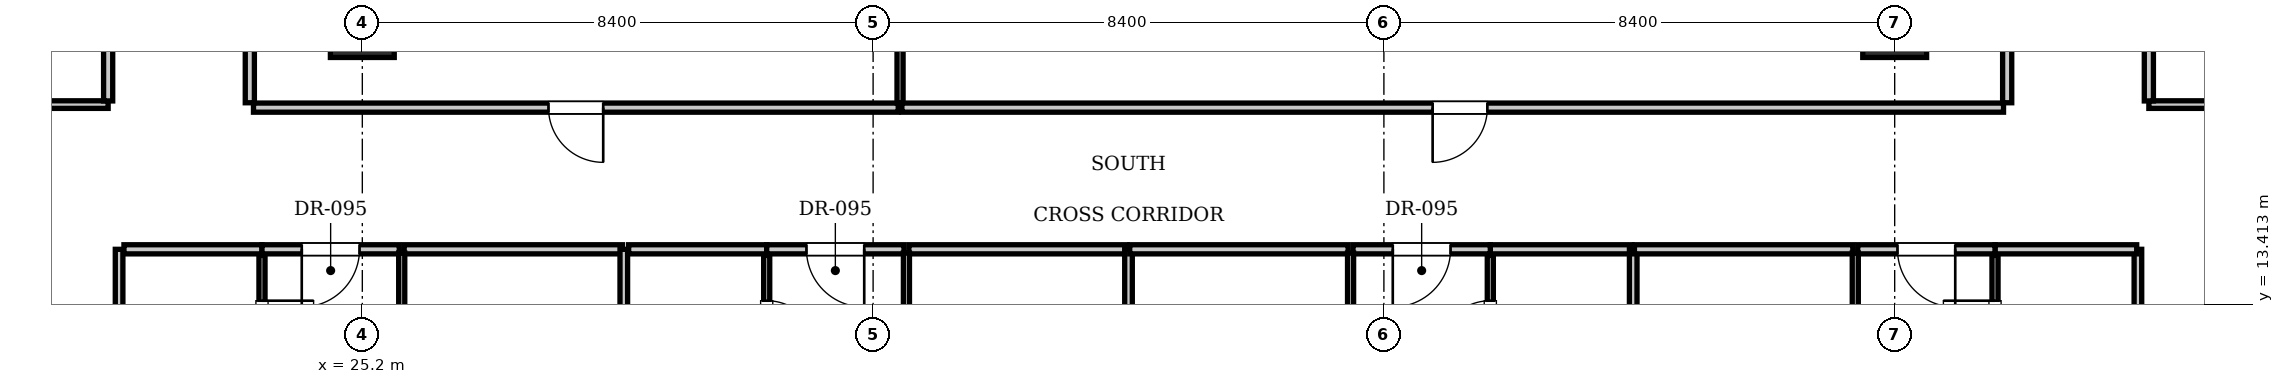
"""IFC4 building model, lengths in metres.
Left out: names, types, materials, properties, quantities, classifications, styles, units other than length and angle.
Written with IfcOpenShell. Run it as: python <this file> out.ifc"""

import sys

from ifc_helpers import new_model, si_unit, direction, frame, frame_2d, origin, origin_2d, place, context, subcontext, project, spatial, rectangle, extrude, element, fill, save


model = new_model("IFC4")
c1 = context("Model", 3, precision=1e-05, world=origin(), true_north=direction((0.0, 1.0)))
c2 = subcontext(c1, "Body", "Model", "MODEL_VIEW")
j1 = project(units=[si_unit("LENGTHUNIT", "METRE"), si_unit("PLANEANGLEUNIT", "RADIAN")], contexts=[c1])
p1 = place(None, origin())
s1 = spatial("IfcSite", under=j1, at=p1, CompositionType="ELEMENT")
p2 = place(p1, origin())
s2 = spatial("IfcBuilding", under=s1, at=p2, CompositionType="ELEMENT")
p3 = place(p2, frame((0.0, 0.0, 50.05)))
s3 = spatial("IfcBuildingStorey", under=s2, at=p3, CompositionType="ELEMENT", Elevation=50.05)
for number, where, z_axis, x_axis in (
    (1, (25.2, 18.0, 0.0), (0.0, 0.0, 1.0), (1.0, 0.0, 0.0)),
    (2, (50.4, 18.0, 0.0), (0.0, 0.0, 1.0), (1.0, 0.0, 0.0)),
):
    element("IfcColumn", number, at=place(p3, frame(where, z_axis=z_axis, x_axis=x_axis)), inside=s3, PredefinedType="COLUMN", context=c2, shape_type="SweptSolid", body=[
        extrude(rectangle(XDim=1.05, YDim=1.05, at=origin_2d()), origin(), (0.0, 0.0, 1.0), 3.85),
    ])
for number, where, z_axis, x_axis in (
    (3, (23.35, 16.73, 0.0), (0.0, 0.0, 1.0), (0.0, 1.0, 0.0)),
    (4, (52.25, 16.73, 0.0), (0.0, 0.0, 1.0), (0.0, 1.0, 0.0)),
):
    element("IfcWall", number, at=place(p3, frame(where, z_axis=z_axis, x_axis=x_axis)), inside=s3, PredefinedType="PARTITIONING", context=c2, shape_type="SweptSolid", body=[
        extrude(rectangle(XDim=7.53, YDim=0.15, at=frame_2d((3.765, 0.0))), origin(), (0.0, 0.0, 1.0), 3.61),
    ])
p4 = place(p3, frame((23.41, 16.65, 0.0), z_axis=(0.0, 0.0, 1.0), x_axis=(1.0, 0.0, 0.0)))
e5 = element("IfcWall", 5, at=p4, inside=s3, PredefinedType="PARTITIONING", context=c2, shape_type="SweptSolid", body=[
    extrude(rectangle(XDim=10.603, YDim=0.15, at=frame_2d((5.302, 0.0))), origin(), (0.0, 0.0, 1.0), 3.61),
])
p5 = place(p4, frame((4.852, 0.0, 0.0)))
e6 = element("IfcOpeningElement", 6, at=p5, cuts=e5, PredefinedType="OPENING", context=c2, shape_type="SweptSolid", body=[
    extrude(rectangle(XDim=0.9, YDim=2.1, at=frame_2d((0.45, 1.05))), frame((0.0, 0.085, 0.0), z_axis=(0.0, -1.0, 0.0), x_axis=(1.0, 0.0, 0.0)), (0.0, 0.0, 1.0), 0.17),
])
p6 = place(p3, frame((34.043, 16.73, 0.0), z_axis=(0.0, 0.0, 1.0), x_axis=(0.0, 1.0, 0.0)))
e7 = element("IfcWall", 7, at=p6, inside=s3, PredefinedType="PARTITIONING", context=c2, shape_type="SweptSolid", body=[
    extrude(rectangle(XDim=7.53, YDim=0.1, at=frame_2d((3.765, 0.0))), origin(), (0.0, 0.0, 1.0), 3.61),
])
p7 = place(p3, frame((34.073, 16.65, 0.0), z_axis=(0.0, 0.0, 1.0), x_axis=(1.0, 0.0, 0.0)))
e8 = element("IfcWall", 8, at=p7, inside=s3, PredefinedType="PARTITIONING", context=c2, shape_type="SweptSolid", body=[
    extrude(rectangle(XDim=18.117, YDim=0.15, at=frame_2d((9.059, 0.0))), origin(), (0.0, 0.0, 1.0), 3.61),
])
p8 = place(p7, frame((8.729, 0.0, 0.0)))
e9 = element("IfcOpeningElement", 9, at=p8, cuts=e8, PredefinedType="OPENING", context=c2, shape_type="SweptSolid", body=[
    extrude(rectangle(XDim=0.9, YDim=2.1, at=frame_2d((0.45, 1.05))), frame((0.0, 0.085, 0.0), z_axis=(0.0, -1.0, 0.0), x_axis=(1.0, 0.0, 0.0)), (0.0, 0.0, 1.0), 0.17),
])
for number, where, z_axis, x_axis in (
    (10, (21.2, 0.1, 0.0), (0.0, 0.0, 1.0), (0.0, 1.0, 0.0)),
    (11, (54.4, 0.1, 0.0), (0.0, 0.0, 1.0), (0.0, 1.0, 0.0)),
):
    element("IfcWall", number, at=place(p3, frame(where, z_axis=z_axis, x_axis=x_axis)), inside=s3, PredefinedType="PARTITIONING", context=c2, shape_type="SweptSolid", body=[
        extrude(rectangle(XDim=14.22, YDim=0.125, at=frame_2d((7.11, 0.0))), origin(), (0.0, 0.0, 1.0), 3.61),
    ])
p9 = place(p3, frame((21.28, 14.32, 0.0), z_axis=(0.0, 0.0, 1.0), x_axis=(1.0, 0.0, 0.0)))
e12 = element("IfcWall", 12, at=p9, inside=s3, PredefinedType="PARTITIONING", context=c2, shape_type="SweptSolid", body=[
    extrude(rectangle(XDim=2.27, YDim=0.15, at=frame_2d((1.135, 0.0))), origin(), (0.0, 0.0, 1.0), 3.61),
])
p10 = place(p3, frame((23.55, 11.88, 0.0), z_axis=(0.0, 0.0, 1.0), x_axis=(0.0, 1.0, 0.0)))
e13 = element("IfcWall", 13, at=p10, inside=s3, PredefinedType="PARTITIONING", context=c2, shape_type="SweptSolid", body=[
    extrude(rectangle(XDim=2.34, YDim=0.1, at=frame_2d((1.17, 0.0))), origin(), (0.0, 0.0, 1.0), 3.61),
])
p11 = place(p10, frame((0.745, 0.0, 0.0)))
e14 = element("IfcOpeningElement", 14, at=p11, cuts=e13, PredefinedType="OPENING", context=c2, shape_type="SweptSolid", body=[
    extrude(rectangle(XDim=0.85, YDim=2.1, at=frame_2d((0.425, 1.05))), frame((0.0, 0.06, 0.0), z_axis=(0.0, -1.0, 0.0), x_axis=(1.0, 0.0, 0.0)), (0.0, 0.0, 1.0), 0.12),
])
p12 = place(p3, frame((23.55, 14.32, 0.0), z_axis=(0.0, 0.0, 1.0), x_axis=(1.0, 0.0, 0.0)))
e15 = element("IfcWall", 15, at=p12, inside=s3, PredefinedType="PARTITIONING", context=c2, shape_type="SweptSolid", body=[
    extrude(rectangle(XDim=2.258, YDim=0.15, at=frame_2d((1.129, 0.0))), origin(), (0.0, 0.0, 1.0), 3.61),
])
p13 = place(p12, frame((0.654, 0.0, 0.0)))
e16 = element("IfcOpeningElement", 16, at=p13, cuts=e15, PredefinedType="OPENING", context=c2, shape_type="SweptSolid", body=[
    extrude(rectangle(XDim=0.95, YDim=2.15, at=frame_2d((0.475, 1.075))), frame((0.0, 0.085, 0.0), z_axis=(0.0, -1.0, 0.0), x_axis=(1.0, 0.0, 0.0)), (0.0, 0.0, 1.0), 0.17),
])
p14 = place(p3, frame((25.888, 14.32, 0.0), z_axis=(0.0, 0.0, 1.0), x_axis=(1.0, 0.0, 0.0)))
e17 = element("IfcWall", 17, at=p14, inside=s3, PredefinedType="PARTITIONING", context=c2, shape_type="SweptSolid", body=[
    extrude(rectangle(XDim=3.592, YDim=0.15, at=frame_2d((1.796, 0.0))), origin(), (0.0, 0.0, 1.0), 3.61),
])
p15 = place(p3, frame((25.848, 0.03, 0.0), z_axis=(0.0, 0.0, 1.0), x_axis=(0.0, 1.0, 0.0)))
e18 = element("IfcWall", 18, at=p15, inside=s3, PredefinedType="PARTITIONING", context=c2, shape_type="SweptSolid", body=[
    extrude(rectangle(XDim=14.23, YDim=0.1, at=frame_2d((7.115, 0.0))), origin(), (0.0, 0.0, 1.0), 3.61),
])
p16 = place(p15, frame((1.6, 0.0, 0.0)))
e19 = element("IfcOpeningElement", 19, at=p16, cuts=e18, PredefinedType="OPENING", context=c2, shape_type="SweptSolid", body=[
    extrude(rectangle(XDim=0.9, YDim=2.1, at=frame_2d((0.45, 1.05))), frame((0.0, 0.06, 0.0), z_axis=(0.0, -1.0, 0.0), x_axis=(1.0, 0.0, 0.0)), (0.0, 0.0, 1.0), 0.12),
])
p17 = place(p3, frame((29.5, 0.1, 0.0), z_axis=(0.0, 0.0, 1.0), x_axis=(0.0, 1.0, 0.0)))
e20 = element("IfcWall", 20, at=p17, inside=s3, PredefinedType="PARTITIONING", context=c2, shape_type="SweptSolid", body=[
    extrude(rectangle(XDim=14.22, YDim=0.125, at=frame_2d((7.11, 0.0))), origin(), (0.0, 0.0, 1.0), 3.255),
])
p18 = place(p3, frame((29.58, 14.32, 0.0), z_axis=(0.0, 0.0, 1.0), x_axis=(1.0, 0.0, 0.0)))
e21 = element("IfcWall", 21, at=p18, inside=s3, PredefinedType="PARTITIONING", context=c2, shape_type="SweptSolid", body=[
    extrude(rectangle(XDim=2.27, YDim=0.15, at=frame_2d((1.135, 0.0))), origin(), (0.0, 0.0, 1.0), 3.61),
])
p19 = place(p3, frame((31.85, 11.88, 0.0), z_axis=(0.0, 0.0, 1.0), x_axis=(0.0, 1.0, 0.0)))
e22 = element("IfcWall", 22, at=p19, inside=s3, PredefinedType="PARTITIONING", context=c2, shape_type="SweptSolid", body=[
    extrude(rectangle(XDim=2.34, YDim=0.1, at=frame_2d((1.17, 0.0))), origin(), (0.0, 0.0, 1.0), 3.61),
])
p20 = place(p19, frame((0.745, 0.0, 0.0)))
e23 = element("IfcOpeningElement", 23, at=p20, cuts=e22, PredefinedType="OPENING", context=c2, shape_type="SweptSolid", body=[
    extrude(rectangle(XDim=0.85, YDim=2.1, at=frame_2d((0.425, 1.05))), frame((0.0, 0.06, 0.0), z_axis=(0.0, -1.0, 0.0), x_axis=(1.0, 0.0, 0.0)), (0.0, 0.0, 1.0), 0.12),
])
p21 = place(p3, frame((31.85, 14.32, 0.0), z_axis=(0.0, 0.0, 1.0), x_axis=(1.0, 0.0, 0.0)))
e24 = element("IfcWall", 24, at=p21, inside=s3, PredefinedType="PARTITIONING", context=c2, shape_type="SweptSolid", body=[
    extrude(rectangle(XDim=2.258, YDim=0.15, at=frame_2d((1.129, 0.0))), origin(), (0.0, 0.0, 1.0), 3.61),
])
p22 = place(p21, frame((0.654, 0.0, 0.0)))
e25 = element("IfcOpeningElement", 25, at=p22, cuts=e24, PredefinedType="OPENING", context=c2, shape_type="SweptSolid", body=[
    extrude(rectangle(XDim=0.95, YDim=2.15, at=frame_2d((0.475, 1.075))), frame((0.0, 0.085, 0.0), z_axis=(0.0, -1.0, 0.0), x_axis=(1.0, 0.0, 0.0)), (0.0, 0.0, 1.0), 0.17),
])
p23 = place(p3, frame((34.188, 14.32, 0.0), z_axis=(0.0, 0.0, 1.0), x_axis=(1.0, 0.0, 0.0)))
e26 = element("IfcWall", 26, at=p23, inside=s3, PredefinedType="PARTITIONING", context=c2, shape_type="SweptSolid", body=[
    extrude(rectangle(XDim=3.592, YDim=0.15, at=frame_2d((1.796, 0.0))), origin(), (0.0, 0.0, 1.0), 3.61),
])
p24 = place(p3, frame((34.148, 0.03, 0.0), z_axis=(0.0, 0.0, 1.0), x_axis=(0.0, 1.0, 0.0)))
e27 = element("IfcWall", 27, at=p24, inside=s3, PredefinedType="PARTITIONING", context=c2, shape_type="SweptSolid", body=[
    extrude(rectangle(XDim=14.23, YDim=0.1, at=frame_2d((7.115, 0.0))), origin(), (0.0, 0.0, 1.0), 3.61),
])
p25 = place(p24, frame((1.6, 0.0, 0.0)))
e28 = element("IfcOpeningElement", 28, at=p25, cuts=e27, PredefinedType="OPENING", context=c2, shape_type="SweptSolid", body=[
    extrude(rectangle(XDim=0.9, YDim=2.1, at=frame_2d((0.45, 1.05))), frame((0.0, 0.06, 0.0), z_axis=(0.0, -1.0, 0.0), x_axis=(1.0, 0.0, 0.0)), (0.0, 0.0, 1.0), 0.12),
])
p26 = place(p3, frame((37.8, 0.1, 0.0), z_axis=(0.0, 0.0, 1.0), x_axis=(0.0, 1.0, 0.0)))
e29 = element("IfcWall", 29, at=p26, inside=s3, PredefinedType="PARTITIONING", context=c2, shape_type="SweptSolid", body=[
    extrude(rectangle(XDim=14.22, YDim=0.125, at=frame_2d((7.11, 0.0))), origin(), (0.0, 0.0, 1.0), 3.293),
])
p27 = place(p3, frame((43.75, 14.32, 0.0), z_axis=(0.0, 0.0, 1.0), x_axis=(1.0, 0.0, 0.0)))
e30 = element("IfcWall", 30, at=p27, inside=s3, PredefinedType="PARTITIONING", context=c2, shape_type="SweptSolid", body=[
    extrude(rectangle(XDim=2.33, YDim=0.15, at=frame_2d((1.165, 0.0))), origin(), (0.0, 0.0, 1.0), 3.61),
])
p28 = place(p3, frame((43.75, 11.88, 0.0), z_axis=(0.0, 0.0, 1.0), x_axis=(0.0, 1.0, 0.0)))
e31 = element("IfcWall", 31, at=p28, inside=s3, PredefinedType="PARTITIONING", context=c2, shape_type="SweptSolid", body=[
    extrude(rectangle(XDim=2.34, YDim=0.1, at=frame_2d((1.17, 0.0))), origin(), (0.0, 0.0, 1.0), 3.61),
])
p29 = place(p28, frame((0.745, 0.0, 0.0)))
e32 = element("IfcOpeningElement", 32, at=p29, cuts=e31, PredefinedType="OPENING", context=c2, shape_type="SweptSolid", body=[
    extrude(rectangle(XDim=0.85, YDim=2.1, at=frame_2d((0.425, 1.05))), frame((0.0, 0.06, 0.0), z_axis=(0.0, -1.0, 0.0), x_axis=(1.0, 0.0, 0.0)), (0.0, 0.0, 1.0), 0.12),
])
p30 = place(p3, frame((37.82, 14.32, 0.0), z_axis=(0.0, 0.0, 1.0), x_axis=(1.0, 0.0, 0.0)))
e33 = element("IfcWall", 33, at=p30, inside=s3, PredefinedType="PARTITIONING", context=c2, shape_type="SweptSolid", body=[
    extrude(rectangle(XDim=3.592, YDim=0.15, at=frame_2d((1.796, 0.0))), origin(), (0.0, 0.0, 1.0), 3.61),
])
p31 = place(p3, frame((41.492, 14.32, 0.0), z_axis=(0.0, 0.0, 1.0), x_axis=(1.0, 0.0, 0.0)))
e34 = element("IfcWall", 34, at=p31, inside=s3, PredefinedType="PARTITIONING", context=c2, shape_type="SweptSolid", body=[
    extrude(rectangle(XDim=2.258, YDim=0.15, at=frame_2d((1.129, 0.0))), origin(), (0.0, 0.0, 1.0), 3.61),
])
p32 = place(p31, frame((0.654, 0.0, 0.0)))
e35 = element("IfcOpeningElement", 35, at=p32, cuts=e34, PredefinedType="OPENING", context=c2, shape_type="SweptSolid", body=[
    extrude(rectangle(XDim=0.95, YDim=2.15, at=frame_2d((0.475, 1.075))), frame((0.0, 0.085, 0.0), z_axis=(0.0, -1.0, 0.0), x_axis=(1.0, 0.0, 0.0)), (0.0, 0.0, 1.0), 0.17),
])
p33 = place(p3, frame((41.452, 0.03, 0.0), z_axis=(0.0, 0.0, 1.0), x_axis=(0.0, 1.0, 0.0)))
e36 = element("IfcWall", 36, at=p33, inside=s3, PredefinedType="PARTITIONING", context=c2, shape_type="SweptSolid", body=[
    extrude(rectangle(XDim=14.23, YDim=0.1, at=frame_2d((7.115, 0.0))), origin(), (0.0, 0.0, 1.0), 3.61),
])
p34 = place(p33, frame((1.6, 0.0, 0.0)))
e37 = element("IfcOpeningElement", 37, at=p34, cuts=e36, PredefinedType="OPENING", context=c2, shape_type="SweptSolid", body=[
    extrude(rectangle(XDim=0.9, YDim=2.1, at=frame_2d((0.45, 1.05))), frame((0.0, 0.06, 0.0), z_axis=(0.0, -1.0, 0.0), x_axis=(1.0, 0.0, 0.0)), (0.0, 0.0, 1.0), 0.12),
])
p35 = place(p3, frame((46.1, 0.1, 0.0), z_axis=(0.0, 0.0, 1.0), x_axis=(0.0, 1.0, 0.0)))
e38 = element("IfcWall", 38, at=p35, inside=s3, PredefinedType="PARTITIONING", context=c2, shape_type="SweptSolid", body=[
    extrude(rectangle(XDim=14.22, YDim=0.125, at=frame_2d((7.11, 0.0))), origin(), (0.0, 0.0, 1.0), 3.344),
])
p36 = place(p3, frame((52.05, 14.32, 0.0), z_axis=(0.0, 0.0, 1.0), x_axis=(1.0, 0.0, 0.0)))
e39 = element("IfcWall", 39, at=p36, inside=s3, PredefinedType="PARTITIONING", context=c2, shape_type="SweptSolid", body=[
    extrude(rectangle(XDim=2.33, YDim=0.15, at=frame_2d((1.165, 0.0))), origin(), (0.0, 0.0, 1.0), 3.61),
])
p37 = place(p3, frame((52.05, 11.88, 0.0), z_axis=(0.0, 0.0, 1.0), x_axis=(0.0, 1.0, 0.0)))
e40 = element("IfcWall", 40, at=p37, inside=s3, PredefinedType="PARTITIONING", context=c2, shape_type="SweptSolid", body=[
    extrude(rectangle(XDim=2.34, YDim=0.1, at=frame_2d((1.17, 0.0))), origin(), (0.0, 0.0, 1.0), 3.61),
])
p38 = place(p37, frame((0.745, 0.0, 0.0)))
e41 = element("IfcOpeningElement", 41, at=p38, cuts=e40, PredefinedType="OPENING", context=c2, shape_type="SweptSolid", body=[
    extrude(rectangle(XDim=0.85, YDim=2.1, at=frame_2d((0.425, 1.05))), frame((0.0, 0.06, 0.0), z_axis=(0.0, -1.0, 0.0), x_axis=(1.0, 0.0, 0.0)), (0.0, 0.0, 1.0), 0.12),
])
p39 = place(p3, frame((46.12, 14.32, 0.0), z_axis=(0.0, 0.0, 1.0), x_axis=(1.0, 0.0, 0.0)))
e42 = element("IfcWall", 42, at=p39, inside=s3, PredefinedType="PARTITIONING", context=c2, shape_type="SweptSolid", body=[
    extrude(rectangle(XDim=3.592, YDim=0.15, at=frame_2d((1.796, 0.0))), origin(), (0.0, 0.0, 1.0), 3.61),
])
p40 = place(p3, frame((49.792, 14.32, 0.0), z_axis=(0.0, 0.0, 1.0), x_axis=(1.0, 0.0, 0.0)))
e43 = element("IfcWall", 43, at=p40, inside=s3, PredefinedType="PARTITIONING", context=c2, shape_type="SweptSolid", body=[
    extrude(rectangle(XDim=2.258, YDim=0.15, at=frame_2d((1.129, 0.0))), origin(), (0.0, 0.0, 1.0), 3.61),
])
p41 = place(p40, frame((0.654, 0.0, 0.0)))
e44 = element("IfcOpeningElement", 44, at=p41, cuts=e43, PredefinedType="OPENING", context=c2, shape_type="SweptSolid", body=[
    extrude(rectangle(XDim=0.95, YDim=2.15, at=frame_2d((0.475, 1.075))), frame((0.0, 0.085, 0.0), z_axis=(0.0, -1.0, 0.0), x_axis=(1.0, 0.0, 0.0)), (0.0, 0.0, 1.0), 0.17),
])
p42 = place(p3, frame((49.752, 0.03, 0.0), z_axis=(0.0, 0.0, 1.0), x_axis=(0.0, 1.0, 0.0)))
e45 = element("IfcWall", 45, at=p42, inside=s3, PredefinedType="PARTITIONING", context=c2, shape_type="SweptSolid", body=[
    extrude(rectangle(XDim=14.23, YDim=0.1, at=frame_2d((7.115, 0.0))), origin(), (0.0, 0.0, 1.0), 3.61),
])
p43 = place(p42, frame((1.6, 0.0, 0.0)))
e46 = element("IfcOpeningElement", 46, at=p43, cuts=e45, PredefinedType="OPENING", context=c2, shape_type="SweptSolid", body=[
    extrude(rectangle(XDim=0.9, YDim=2.1, at=frame_2d((0.45, 1.05))), frame((0.0, 0.06, 0.0), z_axis=(0.0, -1.0, 0.0), x_axis=(1.0, 0.0, 0.0)), (0.0, 0.0, 1.0), 0.12),
])
p44 = place(p3, frame((10.9, 16.7, 0.0), z_axis=(0.0, 0.0, 1.0), x_axis=(1.0, 0.0, 0.0)))
e47 = element("IfcWall", 47, at=p44, inside=s3, PredefinedType="PARTITIONING", context=c2, shape_type="SweptSolid", body=[
    extrude(rectangle(XDim=10.12, YDim=0.125, at=frame_2d((5.06, 0.0))), origin(), (0.0, 0.0, 1.0), 3.61),
])
p45 = place(p3, frame((54.58, 16.7, 0.0), z_axis=(0.0, 0.0, 1.0), x_axis=(1.0, 0.0, 0.0)))
e48 = element("IfcWall", 48, at=p45, inside=s3, PredefinedType="PARTITIONING", context=c2, shape_type="SweptSolid", body=[
    extrude(rectangle(XDim=10.12, YDim=0.125, at=frame_2d((5.06, 0.0))), origin(), (0.0, 0.0, 1.0), 3.61),
])
p46 = place(p3, frame((21.02, 16.76, 0.0), z_axis=(0.0, 0.0, 1.0), x_axis=(0.0, 1.0, 0.0)))
e49 = element("IfcWall", 49, at=p46, inside=s3, PredefinedType="PARTITIONING", context=c2, shape_type="SweptSolid", body=[
    extrude(rectangle(XDim=3.16, YDim=0.15, at=frame_2d((1.58, 0.0))), origin(), (0.0, 0.0, 1.0), 3.403),
])
p47 = place(p46, frame((1.105, 0.0, 0.0)))
e50 = element("IfcOpeningElement", 50, at=p47, cuts=e49, PredefinedType="OPENING", context=c2, shape_type="SweptSolid", body=[
    extrude(rectangle(XDim=0.95, YDim=2.15, at=frame_2d((0.475, 1.075))), frame((0.0, 0.085, 0.0), z_axis=(0.0, -1.0, 0.0), x_axis=(1.0, 0.0, 0.0)), (0.0, 0.0, 1.0), 0.17),
])
p48 = place(p3, frame((54.58, 16.76, 0.0), z_axis=(0.0, 0.0, 1.0), x_axis=(0.0, 1.0, 0.0)))
e51 = element("IfcWall", 51, at=p48, inside=s3, PredefinedType="PARTITIONING", context=c2, shape_type="SweptSolid", body=[
    extrude(rectangle(XDim=3.16, YDim=0.15, at=frame_2d((1.58, 0.0))), origin(), (0.0, 0.0, 1.0), 3.207),
])
p49 = place(p48, frame((1.105, 0.0, 0.0)))
e52 = element("IfcOpeningElement", 52, at=p49, cuts=e51, PredefinedType="OPENING", context=c2, shape_type="SweptSolid", body=[
    extrude(rectangle(XDim=0.95, YDim=2.15, at=frame_2d((0.475, 1.075))), frame((0.0, 0.085, 0.0), z_axis=(0.0, -1.0, 0.0), x_axis=(1.0, 0.0, 0.0)), (0.0, 0.0, 1.0), 0.17),
])
p50 = place(p5, frame((0.9, 0.0, 0.0), z_axis=(0.0, 0.0, 1.0), x_axis=(-1.0, 0.0, 0.0)))
e53 = element("IfcDoor", 53, at=p50, inside=s3, OperationType="SINGLE_SWING_LEFT", PredefinedType="DOOR", context=c2, shape_type="SweptSolid", body=[
    extrude(rectangle(XDim=0.9, YDim=2.1, at=frame_2d((0.45, 1.05))), frame((0.0, 0.025, 0.0), z_axis=(0.0, -1.0, 0.0), x_axis=(1.0, 0.0, 0.0)), (0.0, 0.0, 1.0), 0.05),
])
fill(e6, e53)
p51 = place(p8, frame((0.9, 0.0, 0.0), z_axis=(0.0, 0.0, 1.0), x_axis=(-1.0, 0.0, 0.0)))
e54 = element("IfcDoor", 54, at=p51, inside=s3, OperationType="SINGLE_SWING_RIGHT", PredefinedType="DOOR", context=c2, shape_type="SweptSolid", body=[
    extrude(rectangle(XDim=0.9, YDim=2.1, at=frame_2d((0.45, 1.05))), frame((0.0, 0.025, 0.0), z_axis=(0.0, -1.0, 0.0), x_axis=(1.0, 0.0, 0.0)), (0.0, 0.0, 1.0), 0.05),
])
fill(e9, e54)
p52 = place(p11, frame((0.85, 0.0, 0.0), z_axis=(0.0, 0.0, 1.0), x_axis=(-1.0, 0.0, 0.0)))
e55 = element("IfcDoor", 55, at=p52, inside=s3, OperationType="SINGLE_SWING_LEFT", PredefinedType="DOOR", context=c2, shape_type="SweptSolid", body=[
    extrude(rectangle(XDim=0.85, YDim=2.1, at=frame_2d((0.425, 1.05))), frame((0.0, 0.025, 0.0), z_axis=(0.0, -1.0, 0.0), x_axis=(1.0, 0.0, 0.0)), (0.0, 0.0, 1.0), 0.05),
])
fill(e14, e55)
p53 = place(p13, frame((0.95, 0.0, 0.0), z_axis=(0.0, 0.0, 1.0), x_axis=(-1.0, 0.0, 0.0)))
e56 = element("IfcDoor", 56, at=p53, inside=s3, OperationType="SINGLE_SWING_RIGHT", PredefinedType="DOOR", context=c2, shape_type="SweptSolid", body=[
    extrude(rectangle(XDim=0.95, YDim=2.15, at=frame_2d((0.475, 1.075))), frame((0.0, 0.025, 0.0), z_axis=(0.0, -1.0, 0.0), x_axis=(1.0, 0.0, 0.0)), (0.0, 0.0, 1.0), 0.05),
])
fill(e16, e56)
p54 = place(p20, frame((0.85, 0.0, 0.0), z_axis=(0.0, 0.0, 1.0), x_axis=(-1.0, 0.0, 0.0)))
e57 = element("IfcDoor", 57, at=p54, inside=s3, OperationType="SINGLE_SWING_RIGHT", PredefinedType="DOOR", context=c2, shape_type="SweptSolid", body=[
    extrude(rectangle(XDim=0.85, YDim=2.1, at=frame_2d((0.425, 1.05))), frame((0.0, 0.025, 0.0), z_axis=(0.0, -1.0, 0.0), x_axis=(1.0, 0.0, 0.0)), (0.0, 0.0, 1.0), 0.05),
])
fill(e23, e57)
p55 = place(p22, frame((0.95, 0.0, 0.0), z_axis=(0.0, 0.0, 1.0), x_axis=(-1.0, 0.0, 0.0)))
e58 = element("IfcDoor", 58, at=p55, inside=s3, OperationType="SINGLE_SWING_LEFT", PredefinedType="DOOR", context=c2, shape_type="SweptSolid", body=[
    extrude(rectangle(XDim=0.95, YDim=2.15, at=frame_2d((0.475, 1.075))), frame((0.0, 0.025, 0.0), z_axis=(0.0, -1.0, 0.0), x_axis=(1.0, 0.0, 0.0)), (0.0, 0.0, 1.0), 0.05),
])
fill(e25, e58)
p56 = place(p29, origin())
e59 = element("IfcDoor", 59, at=p56, inside=s3, OperationType="SINGLE_SWING_LEFT", PredefinedType="DOOR", context=c2, shape_type="SweptSolid", body=[
    extrude(rectangle(XDim=0.85, YDim=2.1, at=frame_2d((0.425, 1.05))), frame((0.0, 0.025, 0.0), z_axis=(0.0, -1.0, 0.0), x_axis=(1.0, 0.0, 0.0)), (0.0, 0.0, 1.0), 0.05),
])
fill(e32, e59)
p57 = place(p32, frame((0.95, 0.0, 0.0), z_axis=(0.0, 0.0, 1.0), x_axis=(-1.0, 0.0, 0.0)))
e60 = element("IfcDoor", 60, at=p57, inside=s3, OperationType="SINGLE_SWING_RIGHT", PredefinedType="DOOR", context=c2, shape_type="SweptSolid", body=[
    extrude(rectangle(XDim=0.95, YDim=2.15, at=frame_2d((0.475, 1.075))), frame((0.0, 0.025, 0.0), z_axis=(0.0, -1.0, 0.0), x_axis=(1.0, 0.0, 0.0)), (0.0, 0.0, 1.0), 0.05),
])
fill(e35, e60)
p58 = place(p38, origin())
e61 = element("IfcDoor", 61, at=p58, inside=s3, OperationType="SINGLE_SWING_RIGHT", PredefinedType="DOOR", context=c2, shape_type="SweptSolid", body=[
    extrude(rectangle(XDim=0.85, YDim=2.1, at=frame_2d((0.425, 1.05))), frame((0.0, 0.025, 0.0), z_axis=(0.0, -1.0, 0.0), x_axis=(1.0, 0.0, 0.0)), (0.0, 0.0, 1.0), 0.05),
])
fill(e41, e61)
p59 = place(p41, frame((0.95, 0.0, 0.0), z_axis=(0.0, 0.0, 1.0), x_axis=(-1.0, 0.0, 0.0)))
e62 = element("IfcDoor", 62, at=p59, inside=s3, OperationType="SINGLE_SWING_LEFT", PredefinedType="DOOR", context=c2, shape_type="SweptSolid", body=[
    extrude(rectangle(XDim=0.95, YDim=2.15, at=frame_2d((0.475, 1.075))), frame((0.0, 0.025, 0.0), z_axis=(0.0, -1.0, 0.0), x_axis=(1.0, 0.0, 0.0)), (0.0, 0.0, 1.0), 0.05),
])
fill(e44, e62)
save(model, sys.argv[1])
